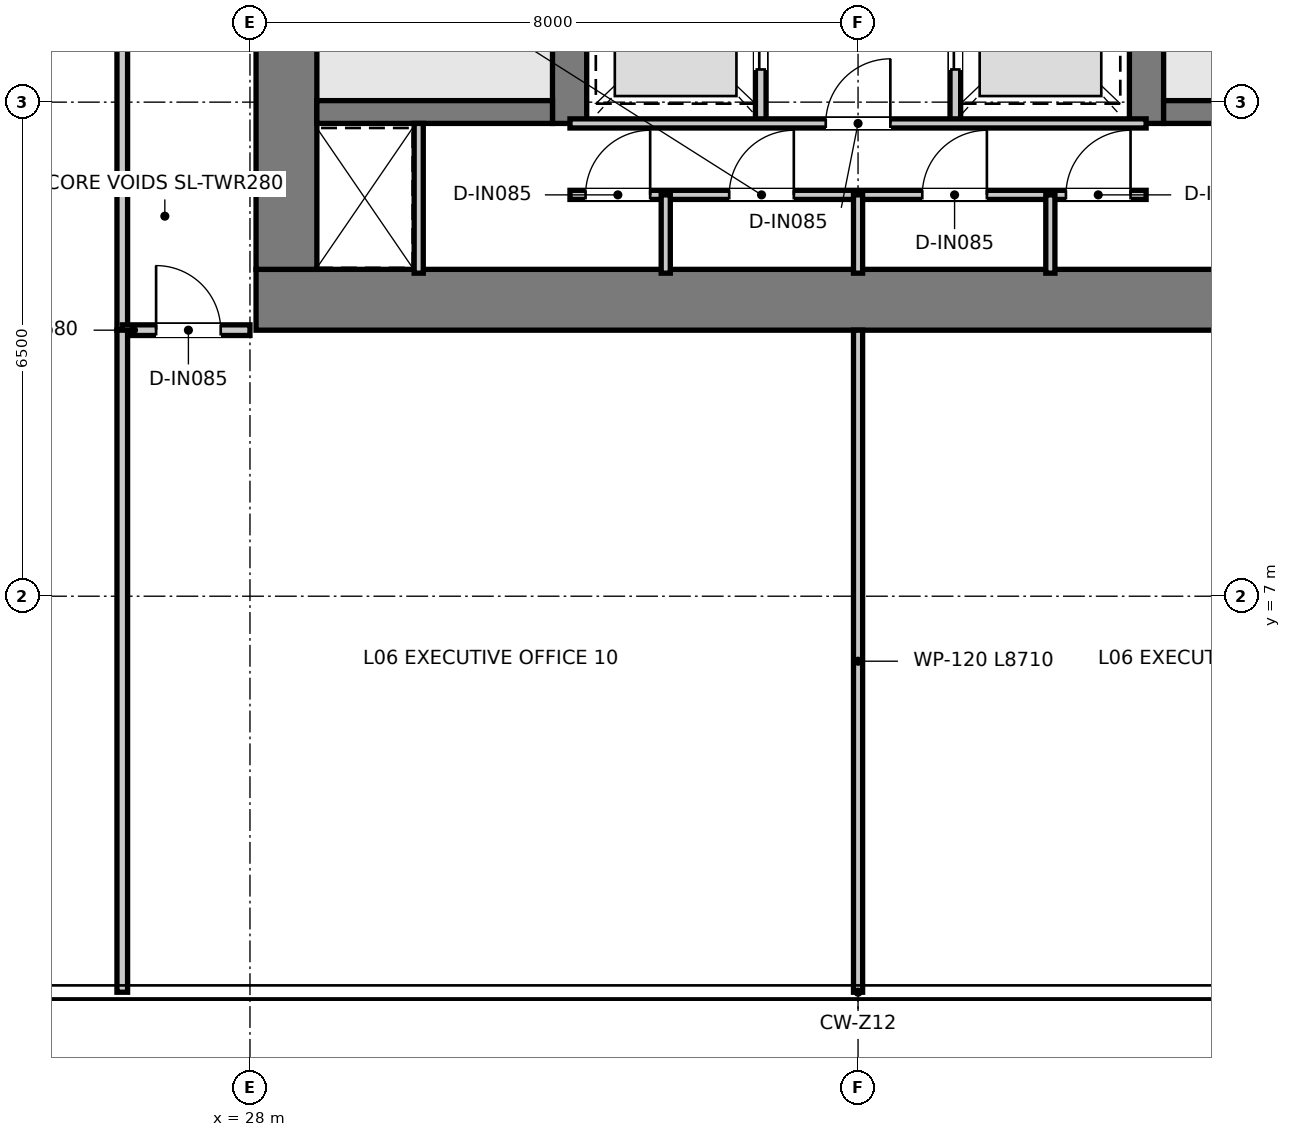
"""IFC4 building model, lengths in metres.
Left out: names, types, materials, properties, quantities, classifications, styles, units other than length and angle.
Written with IfcOpenShell. Run it as: python <this file> out.ifc"""

import sys

from ifc_helpers import new_model, si_unit, direction, frame, frame_2d, origin, place, context, subcontext, project, spatial, rectangle, extrude, element, fill, save


model = new_model("IFC4")
c1 = context("Model", 3, precision=1e-05, world=origin(), true_north=direction((0.0, 1.0)))
c2 = subcontext(c1, "Body", "Model", "MODEL_VIEW")
j1 = project(units=[si_unit("LENGTHUNIT", "METRE"), si_unit("PLANEANGLEUNIT", "RADIAN")], contexts=[c1])
p1 = place(None, origin())
s1 = spatial("IfcSite", under=j1, at=p1, CompositionType="ELEMENT")
p2 = place(p1, origin())
s2 = spatial("IfcBuilding", under=s1, at=p2, CompositionType="ELEMENT")
p3 = place(p2, frame((0.0, 0.0, 28.95)))
s3 = spatial("IfcBuildingStorey", under=s2, at=p3, CompositionType="ELEMENT", Elevation=28.95)
p4 = place(p3, frame((28.08, 10.9, 0.0), z_axis=(0.0, 0.0, 1.0), x_axis=(1.0, 0.0, 0.0)))
e1 = element("IfcWall", 1, at=p4, inside=s3, PredefinedType="SHEAR", context=c2, shape_type="SweptSolid", body=[
    extrude(rectangle(XDim=15.84, YDim=0.8, at=frame_2d((7.92, 0.0))), origin(), (0.0, 0.0, 1.0), 3.95),
])
p5 = place(p3, frame((28.48, 11.3, 0.0), z_axis=(0.0, 0.0, 1.0), x_axis=(0.0, 1.0, 0.0)))
e2 = element("IfcWall", 2, at=p5, inside=s3, PredefinedType="SHEAR", context=c2, shape_type="SweptSolid", body=[
    extrude(rectangle(XDim=14.7, YDim=0.8, at=frame_2d((7.35, 0.0))), origin(), (0.0, 0.0, 1.0), 3.95),
])
p6 = place(p3, frame((32.205, 13.22, 0.0), z_axis=(0.0, 0.0, 1.0), x_axis=(0.0, 1.0, 0.0)))
e3 = element("IfcWall", 3, at=p6, inside=s3, PredefinedType="SHEAR", context=c2, shape_type="SweptSolid", body=[
    extrude(rectangle(XDim=12.78, YDim=0.45, at=frame_2d((6.39, 0.0))), origin(), (0.0, 0.0, 1.0), 3.95),
])
p7 = place(p6, frame((10.58, 0.0, 0.0)))
e4 = element("IfcOpeningElement", 4, at=p7, cuts=e3, PredefinedType="OPENING", context=c2, shape_type="SweptSolid", body=[
    extrude(rectangle(XDim=1.1, YDim=2.15, at=frame_2d((0.55, 1.075))), frame((0.0, 0.235, 0.0), z_axis=(0.0, -1.0, 0.0), x_axis=(1.0, 0.0, 0.0)), (0.0, 0.0, 1.0), 0.47),
])
p8 = place(p3, frame((39.795, 13.22, 0.0), z_axis=(0.0, 0.0, 1.0), x_axis=(0.0, 1.0, 0.0)))
e5 = element("IfcWall", 5, at=p8, inside=s3, PredefinedType="SHEAR", context=c2, shape_type="SweptSolid", body=[
    extrude(rectangle(XDim=12.78, YDim=0.45, at=frame_2d((6.39, 0.0))), origin(), (0.0, 0.0, 1.0), 3.95),
])
p9 = place(p8, frame((10.58, 0.0, 0.0)))
e6 = element("IfcOpeningElement", 6, at=p9, cuts=e5, PredefinedType="OPENING", context=c2, shape_type="SweptSolid", body=[
    extrude(rectangle(XDim=1.1, YDim=2.15, at=frame_2d((0.55, 1.075))), frame((0.0, 0.235, 0.0), z_axis=(0.0, -1.0, 0.0), x_axis=(1.0, 0.0, 0.0)), (0.0, 0.0, 1.0), 0.47),
])
for number, where, z_axis, x_axis in (
    (7, (28.88, 13.37, 0.0), (0.0, 0.0, 1.0), (1.0, 0.0, 0.0)),
    (8, (40.02, 13.37, 0.0), (0.0, 0.0, 1.0), (1.0, 0.0, 0.0)),
):
    element("IfcWall", number, at=place(p3, frame(where, z_axis=z_axis, x_axis=x_axis)), inside=s3, PredefinedType="SHEAR", context=c2, shape_type="SweptSolid", body=[
        extrude(rectangle(XDim=3.1, YDim=0.3, at=frame_2d((1.55, 0.0))), origin(), (0.0, 0.0, 1.0), 3.95),
    ])
p10 = place(p3, frame((34.72, 13.22, 0.0), z_axis=(0.0, 0.0, 1.0), x_axis=(0.0, 1.0, 0.0)))
e9 = element("IfcWall", 9, at=p10, inside=s3, PredefinedType="PARTITIONING", context=c2, shape_type="SweptSolid", body=[
    extrude(rectangle(XDim=4.56, YDim=0.14, at=frame_2d((2.28, 0.0))), origin(), (0.0, 0.0, 1.0), 3.67),
])
p11 = place(p10, frame((0.71, 0.0, 0.0)))
e10 = element("IfcOpeningElement", 10, at=p11, cuts=e9, PredefinedType="OPENING", context=c2, shape_type="SweptSolid", body=[
    extrude(rectangle(XDim=1.1, YDim=2.15, at=frame_2d((0.55, 1.075))), frame((0.0, 0.08, 0.0), z_axis=(0.0, -1.0, 0.0), x_axis=(1.0, 0.0, 0.0)), (0.0, 0.0, 1.0), 0.16),
])
p12 = place(p10, frame((2.91, 0.0, 0.0)))
e11 = element("IfcOpeningElement", 11, at=p12, cuts=e9, PredefinedType="OPENING", context=c2, shape_type="SweptSolid", body=[
    extrude(rectangle(XDim=1.1, YDim=2.15, at=frame_2d((0.55, 1.075))), frame((0.0, 0.08, 0.0), z_axis=(0.0, -1.0, 0.0), x_axis=(1.0, 0.0, 0.0)), (0.0, 0.0, 1.0), 0.16),
])
p13 = place(p3, frame((37.28, 13.22, 0.0), z_axis=(0.0, 0.0, 1.0), x_axis=(0.0, 1.0, 0.0)))
e12 = element("IfcWall", 12, at=p13, inside=s3, PredefinedType="PARTITIONING", context=c2, shape_type="SweptSolid", body=[
    extrude(rectangle(XDim=4.56, YDim=0.14, at=frame_2d((2.28, 0.0))), origin(), (0.0, 0.0, 1.0), 3.67),
])
p14 = place(p13, frame((0.71, 0.0, 0.0)))
e13 = element("IfcOpeningElement", 13, at=p14, cuts=e12, PredefinedType="OPENING", context=c2, shape_type="SweptSolid", body=[
    extrude(rectangle(XDim=1.1, YDim=2.15, at=frame_2d((0.55, 1.075))), frame((0.0, 0.08, 0.0), z_axis=(0.0, -1.0, 0.0), x_axis=(1.0, 0.0, 0.0)), (0.0, 0.0, 1.0), 0.16),
])
p15 = place(p13, frame((2.91, 0.0, 0.0)))
e14 = element("IfcOpeningElement", 14, at=p15, cuts=e12, PredefinedType="OPENING", context=c2, shape_type="SweptSolid", body=[
    extrude(rectangle(XDim=1.1, YDim=2.15, at=frame_2d((0.55, 1.075))), frame((0.0, 0.08, 0.0), z_axis=(0.0, -1.0, 0.0), x_axis=(1.0, 0.0, 0.0)), (0.0, 0.0, 1.0), 0.16),
])
p16 = place(p3, frame((30.22, 11.25, 0.0), z_axis=(0.0, 0.0, 1.0), x_axis=(0.0, 1.0, 0.0)))
e15 = element("IfcWall", 15, at=p16, inside=s3, PredefinedType="PARTITIONING", context=c2, shape_type="SweptSolid", body=[
    extrude(rectangle(XDim=1.97, YDim=0.12, at=frame_2d((0.985, 0.0))), origin(), (0.0, 0.0, 1.0), 3.67),
])
p17 = place(p3, frame((32.21, 13.22, 0.0), z_axis=(0.0, 0.0, 1.0), x_axis=(1.0, 0.0, 0.0)))
e16 = element("IfcWall", 16, at=p17, inside=s3, PredefinedType="PARTITIONING", context=c2, shape_type="SweptSolid", body=[
    extrude(rectangle(XDim=7.58, YDim=0.12, at=frame_2d((3.79, 0.0))), origin(), (0.0, 0.0, 1.0), 3.67),
])
p18 = place(p17, frame((3.365, 0.0, 0.0)))
e17 = element("IfcOpeningElement", 17, at=p18, cuts=e16, PredefinedType="OPENING", context=c2, shape_type="SweptSolid", body=[
    extrude(rectangle(XDim=0.85, YDim=2.1, at=frame_2d((0.425, 1.05))), frame((0.0, 0.07, 0.0), z_axis=(0.0, -1.0, 0.0), x_axis=(1.0, 0.0, 0.0)), (0.0, 0.0, 1.0), 0.14),
])
p19 = place(p3, frame((32.21, 12.28, 0.0), z_axis=(0.0, 0.0, 1.0), x_axis=(1.0, 0.0, 0.0)))
e18 = element("IfcWall", 18, at=p19, inside=s3, PredefinedType="PARTITIONING", context=c2, shape_type="SweptSolid", body=[
    extrude(rectangle(XDim=7.58, YDim=0.12, at=frame_2d((3.79, 0.0))), origin(), (0.0, 0.0, 1.0), 3.67),
])
p20 = place(p19, frame((0.205, 0.0, 0.0)))
e19 = element("IfcOpeningElement", 19, at=p20, cuts=e18, PredefinedType="OPENING", context=c2, shape_type="SweptSolid", body=[
    extrude(rectangle(XDim=0.85, YDim=2.1, at=frame_2d((0.425, 1.05))), frame((0.0, 0.07, 0.0), z_axis=(0.0, -1.0, 0.0), x_axis=(1.0, 0.0, 0.0)), (0.0, 0.0, 1.0), 0.14),
])
p21 = place(p19, frame((2.095, 0.0, 0.0)))
e20 = element("IfcOpeningElement", 20, at=p21, cuts=e18, PredefinedType="OPENING", context=c2, shape_type="SweptSolid", body=[
    extrude(rectangle(XDim=0.85, YDim=2.1, at=frame_2d((0.425, 1.05))), frame((0.0, 0.07, 0.0), z_axis=(0.0, -1.0, 0.0), x_axis=(1.0, 0.0, 0.0)), (0.0, 0.0, 1.0), 0.14),
])
p22 = place(p19, frame((4.635, 0.0, 0.0)))
e21 = element("IfcOpeningElement", 21, at=p22, cuts=e18, PredefinedType="OPENING", context=c2, shape_type="SweptSolid", body=[
    extrude(rectangle(XDim=0.85, YDim=2.1, at=frame_2d((0.425, 1.05))), frame((0.0, 0.07, 0.0), z_axis=(0.0, -1.0, 0.0), x_axis=(1.0, 0.0, 0.0)), (0.0, 0.0, 1.0), 0.14),
])
p23 = place(p19, frame((6.525, 0.0, 0.0)))
e22 = element("IfcOpeningElement", 22, at=p23, cuts=e18, PredefinedType="OPENING", context=c2, shape_type="SweptSolid", body=[
    extrude(rectangle(XDim=0.85, YDim=2.1, at=frame_2d((0.425, 1.05))), frame((0.0, 0.07, 0.0), z_axis=(0.0, -1.0, 0.0), x_axis=(1.0, 0.0, 0.0)), (0.0, 0.0, 1.0), 0.14),
])
for number, where, z_axis, x_axis in (
    (23, (33.47, 11.25, 0.0), (0.0, 0.0, 1.0), (0.0, 1.0, 0.0)),
    (24, (36.0, 11.25, 0.0), (0.0, 0.0, 1.0), (0.0, 1.0, 0.0)),
    (25, (38.53, 11.25, 0.0), (0.0, 0.0, 1.0), (0.0, 1.0, 0.0)),
):
    element("IfcWall", number, at=place(p3, frame(where, z_axis=z_axis, x_axis=x_axis)), inside=s3, PredefinedType="PARTITIONING", context=c2, shape_type="SweptSolid", body=[
        extrude(rectangle(XDim=1.03, YDim=0.12, at=frame_2d((0.515, 0.0))), origin(), (0.0, 0.0, 1.0), 3.67),
    ])
p24 = place(p3, frame((26.32, 10.5, 0.0), z_axis=(0.0, 0.0, 1.0), x_axis=(0.0, 1.0, 0.0)))
e26 = element("IfcWall", 26, at=p24, inside=s3, PredefinedType="PARTITIONING", context=c2, shape_type="SweptSolid", body=[
    extrude(rectangle(XDim=25.62, YDim=0.14, at=frame_2d((12.81, 0.0))), origin(), (0.0, 0.0, 1.0), 2.97),
])
p25 = place(p24, frame((7.775, 0.0, 0.0)))
e27 = element("IfcOpeningElement", 27, at=p25, cuts=e26, PredefinedType="OPENING", context=c2, shape_type="SweptSolid", body=[
    extrude(rectangle(XDim=0.95, YDim=2.1, at=frame_2d((0.475, 1.05))), frame((0.0, 0.08, 0.0), z_axis=(0.0, -1.0, 0.0), x_axis=(1.0, 0.0, 0.0)), (0.0, 0.0, 1.0), 0.16),
])
p26 = place(p24, frame((12.425, 0.0, 0.0)))
e28 = element("IfcOpeningElement", 28, at=p26, cuts=e26, PredefinedType="OPENING", context=c2, shape_type="SweptSolid", body=[
    extrude(rectangle(XDim=0.95, YDim=2.1, at=frame_2d((0.475, 1.05))), frame((0.0, 0.08, 0.0), z_axis=(0.0, -1.0, 0.0), x_axis=(1.0, 0.0, 0.0)), (0.0, 0.0, 1.0), 0.16),
])
p27 = place(p24, frame((18.825, 0.0, 0.0)))
e29 = element("IfcOpeningElement", 29, at=p27, cuts=e26, PredefinedType="OPENING", context=c2, shape_type="SweptSolid", body=[
    extrude(rectangle(XDim=0.95, YDim=2.1, at=frame_2d((0.475, 1.05))), frame((0.0, 0.08, 0.0), z_axis=(0.0, -1.0, 0.0), x_axis=(1.0, 0.0, 0.0)), (0.0, 0.0, 1.0), 0.16),
])
p28 = place(p24, frame((22.775, 0.0, 0.0)))
e30 = element("IfcOpeningElement", 30, at=p28, cuts=e26, PredefinedType="OPENING", context=c2, shape_type="SweptSolid", body=[
    extrude(rectangle(XDim=0.95, YDim=2.1, at=frame_2d((0.475, 1.05))), frame((0.0, 0.08, 0.0), z_axis=(0.0, -1.0, 0.0), x_axis=(1.0, 0.0, 0.0)), (0.0, 0.0, 1.0), 0.16),
])
p29 = place(p3, frame((26.32, 10.5, 0.0), z_axis=(0.0, 0.0, 1.0), x_axis=(1.0, 0.0, 0.0)))
e31 = element("IfcWall", 31, at=p29, inside=s3, PredefinedType="PARTITIONING", context=c2, shape_type="SweptSolid", body=[
    extrude(rectangle(XDim=1.68, YDim=0.14, at=frame_2d((0.84, 0.0))), origin(), (0.0, 0.0, 1.0), 3.67),
])
p30 = place(p29, frame((0.445, 0.0, 0.0)))
e32 = element("IfcOpeningElement", 32, at=p30, cuts=e31, PredefinedType="OPENING", context=c2, shape_type="SweptSolid", body=[
    extrude(rectangle(XDim=0.85, YDim=2.1, at=frame_2d((0.425, 1.05))), frame((0.0, 0.08, 0.0), z_axis=(0.0, -1.0, 0.0), x_axis=(1.0, 0.0, 0.0)), (0.0, 0.0, 1.0), 0.16),
])
p31 = place(p3, frame((26.32, 1.79, 0.0), z_axis=(0.0, 0.0, 1.0), x_axis=(0.0, 1.0, 0.0)))
e33 = element("IfcWall", 33, at=p31, inside=s3, PredefinedType="PARTITIONING", context=c2, shape_type="SweptSolid", body=[
    extrude(rectangle(XDim=8.71, YDim=0.14, at=frame_2d((4.355, 0.0))), origin(), (0.0, 0.0, 1.0), 3.67),
])
p32 = place(p3, frame((36.0, 1.79, 0.0), z_axis=(0.0, 0.0, 1.0), x_axis=(0.0, 1.0, 0.0)))
e34 = element("IfcWall", 34, at=p32, inside=s3, PredefinedType="PARTITIONING", context=c2, shape_type="SweptSolid", body=[
    extrude(rectangle(XDim=8.71, YDim=0.12, at=frame_2d((4.355, 0.0))), origin(), (0.0, 0.0, 1.0), 3.67),
])
p33 = place(p11, origin())
e35 = element("IfcDoor", 35, at=p33, inside=s3, OperationType="DOUBLE_DOOR_SLIDING", PredefinedType="DOOR", context=c2, shape_type="SweptSolid", body=[
    extrude(rectangle(XDim=1.1, YDim=2.15, at=frame_2d((0.55, 1.075))), frame((0.0, 0.025, 0.0), z_axis=(0.0, -1.0, 0.0), x_axis=(1.0, 0.0, 0.0)), (0.0, 0.0, 1.0), 0.05),
])
fill(e10, e35)
p34 = place(p14, origin())
e36 = element("IfcDoor", 36, at=p34, inside=s3, OperationType="DOUBLE_DOOR_SLIDING", PredefinedType="DOOR", context=c2, shape_type="SweptSolid", body=[
    extrude(rectangle(XDim=1.1, YDim=2.15, at=frame_2d((0.55, 1.075))), frame((0.0, 0.025, 0.0), z_axis=(0.0, -1.0, 0.0), x_axis=(1.0, 0.0, 0.0)), (0.0, 0.0, 1.0), 0.05),
])
fill(e13, e36)
p35 = place(p18, origin())
e37 = element("IfcDoor", 37, at=p35, inside=s3, OperationType="SINGLE_SWING_RIGHT", PredefinedType="DOOR", context=c2, shape_type="SweptSolid", body=[
    extrude(rectangle(XDim=0.85, YDim=2.1, at=frame_2d((0.425, 1.05))), frame((0.0, 0.025, 0.0), z_axis=(0.0, -1.0, 0.0), x_axis=(1.0, 0.0, 0.0)), (0.0, 0.0, 1.0), 0.05),
])
fill(e17, e37)
p36 = place(p20, origin())
e38 = element("IfcDoor", 38, at=p36, inside=s3, OperationType="SINGLE_SWING_RIGHT", PredefinedType="DOOR", context=c2, shape_type="SweptSolid", body=[
    extrude(rectangle(XDim=0.85, YDim=2.1, at=frame_2d((0.425, 1.05))), frame((0.0, 0.025, 0.0), z_axis=(0.0, -1.0, 0.0), x_axis=(1.0, 0.0, 0.0)), (0.0, 0.0, 1.0), 0.05),
])
fill(e19, e38)
p37 = place(p21, origin())
e39 = element("IfcDoor", 39, at=p37, inside=s3, OperationType="SINGLE_SWING_RIGHT", PredefinedType="DOOR", context=c2, shape_type="SweptSolid", body=[
    extrude(rectangle(XDim=0.85, YDim=2.1, at=frame_2d((0.425, 1.05))), frame((0.0, 0.025, 0.0), z_axis=(0.0, -1.0, 0.0), x_axis=(1.0, 0.0, 0.0)), (0.0, 0.0, 1.0), 0.05),
])
fill(e20, e39)
p38 = place(p22, origin())
e40 = element("IfcDoor", 40, at=p38, inside=s3, OperationType="SINGLE_SWING_RIGHT", PredefinedType="DOOR", context=c2, shape_type="SweptSolid", body=[
    extrude(rectangle(XDim=0.85, YDim=2.1, at=frame_2d((0.425, 1.05))), frame((0.0, 0.025, 0.0), z_axis=(0.0, -1.0, 0.0), x_axis=(1.0, 0.0, 0.0)), (0.0, 0.0, 1.0), 0.05),
])
fill(e21, e40)
p39 = place(p23, origin())
e41 = element("IfcDoor", 41, at=p39, inside=s3, OperationType="SINGLE_SWING_RIGHT", PredefinedType="DOOR", context=c2, shape_type="SweptSolid", body=[
    extrude(rectangle(XDim=0.85, YDim=2.1, at=frame_2d((0.425, 1.05))), frame((0.0, 0.025, 0.0), z_axis=(0.0, -1.0, 0.0), x_axis=(1.0, 0.0, 0.0)), (0.0, 0.0, 1.0), 0.05),
])
fill(e22, e41)
p40 = place(p30, origin())
e42 = element("IfcDoor", 42, at=p40, inside=s3, OperationType="SINGLE_SWING_LEFT", PredefinedType="DOOR", context=c2, shape_type="SweptSolid", body=[
    extrude(rectangle(XDim=0.85, YDim=2.1, at=frame_2d((0.425, 1.05))), frame((0.0, 0.025, 0.0), z_axis=(0.0, -1.0, 0.0), x_axis=(1.0, 0.0, 0.0)), (0.0, 0.0, 1.0), 0.05),
])
fill(e32, e42)
save(model, sys.argv[1])
